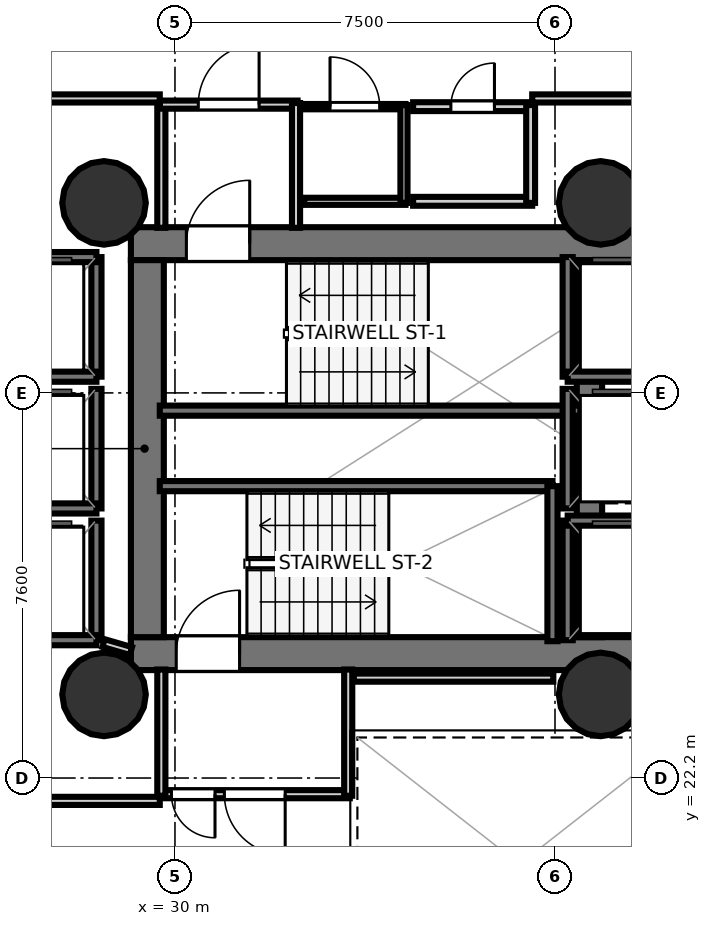
"""IFC4 building model, lengths in metres.
Left out: names, types, materials, properties, quantities, classifications, styles, units other than length and angle.
Written with IfcOpenShell. Run it as: python <this file> out.ifc"""

import sys

from ifc_helpers import new_model, si_unit, direction, frame, frame_2d, origin, origin_2d, place, context, subcontext, project, spatial, rectangle, hollow_circle, extrude, element, fill, save


model = new_model("IFC4")
c1 = context("Model", 3, precision=1e-05, world=origin(), true_north=direction((0.0, 1.0)))
c2 = subcontext(c1, "Body", "Model", "MODEL_VIEW")
j1 = project(units=[si_unit("LENGTHUNIT", "METRE"), si_unit("PLANEANGLEUNIT", "RADIAN")], contexts=[c1])
p1 = place(None, origin())
s1 = spatial("IfcSite", under=j1, at=p1, CompositionType="ELEMENT")
p2 = place(p1, origin())
s2 = spatial("IfcBuilding", under=s1, at=p2, CompositionType="ELEMENT")
p3 = place(p2, frame((0.0, 0.0, 59.9)))
s3 = spatial("IfcBuildingStorey", under=s2, at=p3, CompositionType="ELEMENT", Elevation=59.9)
p4 = place(p3, frame((29.13, 32.745, 0.0), z_axis=(0.0, 0.0, 1.0), x_axis=(1.0, 0.0, 0.0)))
e1 = element("IfcWall", 1, at=p4, inside=s3, PredefinedType="SHEAR", context=c2, shape_type="SweptSolid", body=[
    extrude(rectangle(XDim=10.72, YDim=0.65, at=frame_2d((5.36, 0.0))), origin(), (0.0, 0.0, 1.0), 3.52),
])
p5 = place(p4, frame((1.095, 0.0, 0.0)))
e2 = element("IfcOpeningElement", 2, at=p5, cuts=e1, PredefinedType="OPENING", context=c2, shape_type="SweptSolid", body=[
    extrude(rectangle(XDim=1.25, YDim=2.15, at=frame_2d((0.625, 1.075))), frame((0.0, 0.335, 0.0), z_axis=(0.0, -1.0, 0.0), x_axis=(1.0, 0.0, 0.0)), (0.0, 0.0, 1.0), 0.67),
])
p6 = place(p3, frame((29.13, 24.655, 0.0), z_axis=(0.0, 0.0, 1.0), x_axis=(1.0, 0.0, 0.0)))
e3 = element("IfcWall", 3, at=p6, inside=s3, PredefinedType="SHEAR", context=c2, shape_type="SweptSolid", body=[
    extrude(rectangle(XDim=10.72, YDim=0.65, at=frame_2d((5.36, 0.0))), origin(), (0.0, 0.0, 1.0), 3.52),
])
p7 = place(p6, frame((0.895, 0.0, 0.0)))
e4 = element("IfcOpeningElement", 4, at=p7, cuts=e3, PredefinedType="OPENING", context=c2, shape_type="SweptSolid", body=[
    extrude(rectangle(XDim=1.25, YDim=2.15, at=frame_2d((0.625, 1.075))), frame((0.0, 0.335, 0.0), z_axis=(0.0, -1.0, 0.0), x_axis=(1.0, 0.0, 0.0)), (0.0, 0.0, 1.0), 0.67),
])
p8 = place(p3, frame((29.455, 24.98, 0.0), z_axis=(0.0, 0.0, 1.0), x_axis=(0.0, 1.0, 0.0)))
e5 = element("IfcWall", 5, at=p8, inside=s3, PredefinedType="SHEAR", context=c2, shape_type="SweptSolid", body=[
    extrude(rectangle(XDim=7.44, YDim=0.65, at=frame_2d((3.72, 0.0))), origin(), (0.0, 0.0, 1.0), 3.52),
])
p9 = place(p3, frame((38.18, 24.98, 0.0), z_axis=(0.0, 0.0, 1.0), x_axis=(0.0, 1.0, 0.0)))
e6 = element("IfcWall", 6, at=p9, inside=s3, PredefinedType="SHEAR", context=c2, shape_type="SweptSolid", body=[
    extrude(rectangle(XDim=7.44, YDim=0.5, at=frame_2d((3.72, 0.0))), origin(), (0.0, 0.0, 1.0), 3.52),
])
for number, where, z_axis, x_axis in (
    (7, (28.6, 33.55, 0.0), (0.0, 0.0, 1.0), (1.0, 0.0, 0.0)),
    (8, (28.6, 23.85, 0.0), (0.0, 0.0, 1.0), (1.0, 0.0, 0.0)),
    (9, (38.4, 33.55, 0.0), (0.0, 0.0, 1.0), (1.0, 0.0, 0.0)),
    (10, (38.4, 23.85, 0.0), (0.0, 0.0, 1.0), (1.0, 0.0, 0.0)),
):
    element("IfcColumn", number, at=place(p3, frame(where, z_axis=z_axis, x_axis=x_axis)), inside=s3, PredefinedType="COLUMN", context=c2, shape_type="SweptSolid", body=[
        extrude(hollow_circle(Radius=0.825, WallThickness=0.04, at=origin_2d()), origin(), (0.0, 0.0, 1.0), 3.7),
    ])
p10 = place(p3, frame((29.7, 29.45, 0.0), z_axis=(0.0, 0.0, 1.0), x_axis=(1.0, 0.0, 0.0)))
e11 = element("IfcWall", 11, at=p10, inside=s3, PredefinedType="SOLIDWALL", context=c2, shape_type="SweptSolid", body=[
    extrude(rectangle(XDim=8.3, YDim=0.2, at=frame_2d((4.15, 0.0))), origin(), (0.0, 0.0, 1.0), 3.52),
])
p11 = place(p3, frame((29.7, 27.96, 0.0), z_axis=(0.0, 0.0, 1.0), x_axis=(1.0, 0.0, 0.0)))
e12 = element("IfcWall", 12, at=p11, inside=s3, PredefinedType="SOLIDWALL", context=c2, shape_type="SweptSolid", body=[
    extrude(rectangle(XDim=7.75, YDim=0.2, at=frame_2d((3.875, 0.0))), origin(), (0.0, 0.0, 1.0), 3.52),
])
p12 = place(p3, frame((37.45, 24.9, 0.0), z_axis=(0.0, 0.0, 1.0), x_axis=(0.0, 1.0, 0.0)))
e13 = element("IfcWall", 13, at=p12, inside=s3, PredefinedType="SOLIDWALL", context=c2, shape_type="SweptSolid", body=[
    extrude(rectangle(XDim=3.06, YDim=0.2, at=frame_2d((1.53, 0.0))), origin(), (0.0, 0.0, 1.0), 3.52),
])
p13 = place(p3, frame((37.75, 30.12, 0.0), z_axis=(0.0, 0.0, 1.0), x_axis=(0.0, 1.0, 0.0)))
e14 = element("IfcWall", 14, at=p13, inside=s3, PredefinedType="SOLIDWALL", context=c2, shape_type="SweptSolid", body=[
    extrude(rectangle(XDim=2.36, YDim=0.2, at=frame_2d((1.18, 0.0))), origin(), (0.0, 0.0, 1.0), 3.52),
])
p14 = place(p3, frame((37.75, 30.12, 0.0), z_axis=(0.0, 0.0, 1.0), x_axis=(1.0, 0.0, 0.0)))
e15 = element("IfcWall", 15, at=p14, inside=s3, PredefinedType="SOLIDWALL", context=c2, shape_type="SweptSolid", body=[
    extrude(rectangle(XDim=2.1, YDim=0.2, at=frame_2d((1.05, 0.0))), origin(), (0.0, 0.0, 1.0), 3.52),
])
p15 = place(p3, frame((37.75, 24.92, 0.0), z_axis=(0.0, 0.0, 1.0), x_axis=(0.0, 1.0, 0.0)))
e16 = element("IfcWall", 16, at=p15, inside=s3, PredefinedType="SOLIDWALL", context=c2, shape_type="SweptSolid", body=[
    extrude(rectangle(XDim=2.36, YDim=0.2, at=frame_2d((1.18, 0.0))), origin(), (0.0, 0.0, 1.0), 3.52),
])
p16 = place(p3, frame((37.75, 27.28, 0.0), z_axis=(0.0, 0.0, 1.0), x_axis=(1.0, 0.0, 0.0)))
e17 = element("IfcWall", 17, at=p16, inside=s3, PredefinedType="SOLIDWALL", context=c2, shape_type="SweptSolid", body=[
    extrude(rectangle(XDim=2.1, YDim=0.2, at=frame_2d((1.05, 0.0))), origin(), (0.0, 0.0, 1.0), 3.52),
])
p17 = place(p3, frame((28.45, 30.12, 0.0), z_axis=(0.0, 0.0, 1.0), x_axis=(0.0, 1.0, 0.0)))
e18 = element("IfcWall", 18, at=p17, inside=s3, PredefinedType="SOLIDWALL", context=c2, shape_type="SweptSolid", body=[
    extrude(rectangle(XDim=2.36, YDim=0.2, at=frame_2d((1.18, 0.0))), origin(), (0.0, 0.0, 1.0), 3.52),
])
for number, where, z_axis, x_axis in (
    (19, (26.35, 32.48, 0.0), (0.0, 0.0, 1.0), (1.0, 0.0, 0.0)),
    (20, (26.35, 30.12, 0.0), (0.0, 0.0, 1.0), (1.0, 0.0, 0.0)),
):
    element("IfcWall", number, at=place(p3, frame(where, z_axis=z_axis, x_axis=x_axis)), inside=s3, PredefinedType="SOLIDWALL", context=c2, shape_type="SweptSolid", body=[
        extrude(rectangle(XDim=2.1, YDim=0.2, at=frame_2d((1.05, 0.0))), origin(), (0.0, 0.0, 1.0), 3.52),
    ])
p18 = place(p3, frame((28.45, 27.52, 0.0), z_axis=(0.0, 0.0, 1.0), x_axis=(0.0, 1.0, 0.0)))
e21 = element("IfcWall", 21, at=p18, inside=s3, PredefinedType="SOLIDWALL", context=c2, shape_type="SweptSolid", body=[
    extrude(rectangle(XDim=2.36, YDim=0.2, at=frame_2d((1.18, 0.0))), origin(), (0.0, 0.0, 1.0), 3.52),
])
p19 = place(p3, frame((26.35, 27.52, 0.0), z_axis=(0.0, 0.0, 1.0), x_axis=(1.0, 0.0, 0.0)))
e22 = element("IfcWall", 22, at=p19, inside=s3, PredefinedType="SOLIDWALL", context=c2, shape_type="SweptSolid", body=[
    extrude(rectangle(XDim=2.1, YDim=0.2, at=frame_2d((1.05, 0.0))), origin(), (0.0, 0.0, 1.0), 3.52),
])
p20 = place(p3, frame((28.45, 24.92, 0.0), z_axis=(0.0, 0.0, 1.0), x_axis=(0.0, 1.0, 0.0)))
e23 = element("IfcWall", 23, at=p20, inside=s3, PredefinedType="SOLIDWALL", context=c2, shape_type="SweptSolid", body=[
    extrude(rectangle(XDim=2.36, YDim=0.2, at=frame_2d((1.18, 0.0))), origin(), (0.0, 0.0, 1.0), 3.52),
])
p21 = place(p3, frame((26.35, 24.92, 0.0), z_axis=(0.0, 0.0, 1.0), x_axis=(1.0, 0.0, 0.0)))
e24 = element("IfcWall", 24, at=p21, inside=s3, PredefinedType="SOLIDWALL", context=c2, shape_type="SweptSolid", body=[
    extrude(rectangle(XDim=2.1, YDim=0.2, at=frame_2d((1.05, 0.0))), origin(), (0.0, 0.0, 1.0), 3.52),
])
p22 = place(p3, frame((37.75, 27.52, 0.0), z_axis=(0.0, 0.0, 1.0), x_axis=(0.0, 1.0, 0.0)))
e25 = element("IfcWall", 25, at=p22, inside=s3, PredefinedType="SOLIDWALL", context=c2, shape_type="SweptSolid", body=[
    extrude(rectangle(XDim=2.36, YDim=0.2, at=frame_2d((1.18, 0.0))), origin(), (0.0, 0.0, 1.0), 3.52),
])
p23 = place(p3, frame((29.731, 33.058, 0.0), z_axis=(0.0, 0.0, 1.0), x_axis=(0.0, 1.0, 0.0)))
e26 = element("IfcWall", 26, at=p23, inside=s3, PredefinedType="PARTITIONING", context=c2, shape_type="SweptSolid", body=[
    extrude(rectangle(XDim=2.462, YDim=0.16, at=frame_2d((1.231, 0.0))), origin(), (0.0, 0.0, 1.0), 2.84),
])
p24 = place(p3, frame((29.7, 35.489, 0.0), z_axis=(0.0, 0.0, 1.0), x_axis=(1.0, 0.0, 0.0)))
e27 = element("IfcWall", 27, at=p24, inside=s3, PredefinedType="PARTITIONING", context=c2, shape_type="SweptSolid", body=[
    extrude(rectangle(XDim=2.72, YDim=0.16, at=frame_2d((1.36, 0.0))), origin(), (0.0, 0.0, 1.0), 2.84),
])
p25 = place(p24, frame((0.76, 0.0, 0.0)))
e28 = element("IfcOpeningElement", 28, at=p25, cuts=e27, PredefinedType="OPENING", context=c2, shape_type="SweptSolid", body=[
    extrude(rectangle(XDim=1.2, YDim=2.15, at=frame_2d((0.6, 1.075))), frame((0.0, 0.09, 0.0), z_axis=(0.0, -1.0, 0.0), x_axis=(1.0, 0.0, 0.0)), (0.0, 0.0, 1.0), 0.18),
])
p26 = place(p3, frame((32.389, 35.52, 0.0), z_axis=(0.0, 0.0, 1.0), x_axis=(0.0, -1.0, 0.0)))
e29 = element("IfcWall", 29, at=p26, inside=s3, PredefinedType="PARTITIONING", context=c2, shape_type="SweptSolid", body=[
    extrude(rectangle(XDim=2.462, YDim=0.16, at=frame_2d((1.231, 0.0))), origin(), (0.0, 0.0, 1.0), 2.84),
])
p27 = place(p3, frame((33.45, 21.881, 0.0), z_axis=(0.0, 0.0, 1.0), x_axis=(-1.0, 0.0, 0.0)))
e30 = element("IfcWall", 30, at=p27, inside=s3, PredefinedType="PARTITIONING", context=c2, shape_type="SweptSolid", body=[
    extrude(rectangle(XDim=3.75, YDim=0.16, at=frame_2d((1.875, 0.0))), origin(), (0.0, 0.0, 1.0), 2.84),
])
p28 = place(p27, frame((1.275, 0.0, 0.0)))
e31 = element("IfcOpeningElement", 31, at=p28, cuts=e30, PredefinedType="OPENING", context=c2, shape_type="SweptSolid", body=[
    extrude(rectangle(XDim=1.2, YDim=2.15, at=frame_2d((0.6, 1.075))), frame((0.0, 0.09, 0.0), z_axis=(0.0, -1.0, 0.0), x_axis=(1.0, 0.0, 0.0)), (0.0, 0.0, 1.0), 0.18),
])
p29 = place(p27, frame((2.66, 0.0, 0.0)))
e32 = element("IfcOpeningElement", 32, at=p29, cuts=e30, PredefinedType="OPENING", context=c2, shape_type="SweptSolid", body=[
    extrude(rectangle(XDim=0.86, YDim=2.05, at=frame_2d((0.43, 1.025))), frame((0.0, 0.09, 0.0), z_axis=(0.0, -1.0, 0.0), x_axis=(1.0, 0.0, 0.0)), (0.0, 0.0, 1.0), 0.18),
])
for number, where, z_axis, x_axis in (
    (33, (29.731, 21.85, 0.0), (0.0, 0.0, 1.0), (0.0, 1.0, 0.0)),
    (34, (33.419, 24.342, 0.0), (0.0, 0.0, 1.0), (0.0, -1.0, 0.0)),
):
    element("IfcWall", number, at=place(p3, frame(where, z_axis=z_axis, x_axis=x_axis)), inside=s3, PredefinedType="PARTITIONING", context=c2, shape_type="SweptSolid", body=[
        extrude(rectangle(XDim=2.492, YDim=0.16, at=frame_2d((1.246, 0.0))), origin(), (0.0, 0.0, 1.0), 2.84),
    ])
p30 = place(p3, frame((34.55, 33.581, 0.0), z_axis=(0.0, 0.0, 1.0), x_axis=(-1.0, 0.0, 0.0)))
e35 = element("IfcWall", 35, at=p30, inside=s3, PredefinedType="PARTITIONING", context=c2, shape_type="SweptSolid", body=[
    extrude(rectangle(XDim=2.0, YDim=0.14, at=frame_2d((1.0, 0.0))), origin(), (0.0, 0.0, 1.0), 2.84),
])
p31 = place(p3, frame((32.55, 35.449, 0.0), z_axis=(0.0, 0.0, 1.0), x_axis=(1.0, 0.0, 0.0)))
e36 = element("IfcWall", 36, at=p31, inside=s3, PredefinedType="PARTITIONING", context=c2, shape_type="SweptSolid", body=[
    extrude(rectangle(XDim=2.0, YDim=0.105, at=frame_2d((1.0, 0.0))), origin(), (0.0, 0.0, 1.0), 2.84),
])
p32 = place(p31, frame((0.51, 0.0, 0.0)))
e37 = element("IfcOpeningElement", 37, at=p32, cuts=e36, PredefinedType="OPENING", context=c2, shape_type="SweptSolid", body=[
    extrude(rectangle(XDim=0.98, YDim=2.1, at=frame_2d((0.49, 1.05))), frame((0.0, 0.062, 0.0), z_axis=(0.0, -1.0, 0.0), x_axis=(1.0, 0.0, 0.0)), (0.0, 0.0, 1.0), 0.125),
])
p33 = place(p3, frame((34.519, 35.48, 0.0), z_axis=(0.0, 0.0, 1.0), x_axis=(0.0, -1.0, 0.0)))
e38 = element("IfcWall", 38, at=p33, inside=s3, PredefinedType="PARTITIONING", context=c2, shape_type="SweptSolid", body=[
    extrude(rectangle(XDim=1.93, YDim=0.14, at=frame_2d((0.965, 0.0))), origin(), (0.0, 0.0, 1.0), 2.84),
])
p34 = place(p3, frame((37.05, 33.581, 0.0), z_axis=(0.0, 0.0, 1.0), x_axis=(-1.0, 0.0, 0.0)))
e39 = element("IfcWall", 39, at=p34, inside=s3, PredefinedType="PLUMBINGWALL", context=c2, shape_type="SweptSolid", body=[
    extrude(rectangle(XDim=2.35, YDim=0.175, at=frame_2d((1.175, 0.0))), origin(), (0.0, 0.0, 1.0), 2.84),
])
p35 = place(p3, frame((34.7, 35.449, 0.0), z_axis=(0.0, 0.0, 1.0), x_axis=(1.0, 0.0, 0.0)))
e40 = element("IfcWall", 40, at=p35, inside=s3, PredefinedType="PLUMBINGWALL", context=c2, shape_type="SweptSolid", body=[
    extrude(rectangle(XDim=2.35, YDim=0.175, at=frame_2d((1.175, 0.0))), origin(), (0.0, 0.0, 1.0), 2.84),
])
p36 = place(p35, frame((0.745, 0.0, 0.0)))
e41 = element("IfcOpeningElement", 41, at=p36, cuts=e40, PredefinedType="OPENING", context=c2, shape_type="SweptSolid", body=[
    extrude(rectangle(XDim=0.86, YDim=2.05, at=frame_2d((0.43, 1.025))), frame((0.0, 0.097, 0.0), z_axis=(0.0, -1.0, 0.0), x_axis=(1.0, 0.0, 0.0)), (0.0, 0.0, 1.0), 0.195),
])
p37 = place(p3, frame((37.019, 35.48, 0.0), z_axis=(0.0, 0.0, 1.0), x_axis=(0.0, -1.0, 0.0)))
e42 = element("IfcWall", 42, at=p37, inside=s3, PredefinedType="PLUMBINGWALL", context=c2, shape_type="SweptSolid", body=[
    extrude(rectangle(XDim=1.93, YDim=0.175, at=frame_2d((0.965, 0.0))), origin(), (0.0, 0.0, 1.0), 2.84),
])
p38 = place(p3, frame((29.13, 24.706, 0.0), z_axis=(0.0, 0.0, 1.0), x_axis=(-0.960451214223, 0.278448316742, 0.0)))
e43 = element("IfcWall", 43, at=p38, inside=s3, PredefinedType="PARTITIONING", context=c2, shape_type="SweptSolid", body=[
    extrude(rectangle(XDim=0.562, YDim=0.16, at=frame_2d((0.281, 0.0))), origin(), (0.0, 0.0, 1.0), 2.84),
])
p39 = place(p3, frame((37.467, 24.181, 0.0), z_axis=(0.0, 0.0, 1.0), x_axis=(-1.0, 0.0, 0.0)))
e44 = element("IfcWall", 44, at=p39, inside=s3, PredefinedType="PARTITIONING", context=c2, shape_type="SweptSolid", body=[
    extrude(rectangle(XDim=3.937, YDim=0.16, at=frame_2d((1.968, 0.0))), origin(), (0.0, 0.0, 1.0), 2.84),
])
p40 = place(p3, frame((39.818, 35.611, 0.0), z_axis=(0.0, 0.0, 1.0), x_axis=(-1.0, 0.0, 0.0)))
e45 = element("IfcWall", 45, at=p40, inside=s3, PredefinedType="PARTITIONING", context=c2, shape_type="SweptSolid", body=[
    extrude(rectangle(XDim=2.768, YDim=0.16, at=frame_2d((1.384, 0.0))), origin(), (0.0, 0.0, 1.0), 2.84),
])
p41 = place(p3, frame((29.7, 35.611, 0.0), z_axis=(0.0, 0.0, 1.0), x_axis=(-1.0, 0.0, 0.0)))
e46 = element("IfcWall", 46, at=p41, inside=s3, PredefinedType="PARTITIONING", context=c2, shape_type="SweptSolid", body=[
    extrude(rectangle(XDim=3.28, YDim=0.16, at=frame_2d((1.64, 0.0))), origin(), (0.0, 0.0, 1.0), 2.798),
])
p42 = place(p3, frame((26.42, 21.749, 0.0), z_axis=(0.0, 0.0, 1.0), x_axis=(1.0, 0.0, 0.0)))
e47 = element("IfcWall", 47, at=p42, inside=s3, PredefinedType="PARTITIONING", context=c2, shape_type="SweptSolid", body=[
    extrude(rectangle(XDim=3.28, YDim=0.16, at=frame_2d((1.64, 0.0))), origin(), (0.0, 0.0, 1.0), 2.84),
])
p43 = place(p5, origin())
e48 = element("IfcDoor", 48, at=p43, inside=s3, OperationType="SINGLE_SWING_RIGHT", PredefinedType="DOOR", context=c2, shape_type="SweptSolid", body=[
    extrude(rectangle(XDim=1.25, YDim=2.15, at=frame_2d((0.625, 1.075))), frame((0.0, 0.025, 0.0), z_axis=(0.0, -1.0, 0.0), x_axis=(1.0, 0.0, 0.0)), (0.0, 0.0, 1.0), 0.05),
])
fill(e2, e48)
p44 = place(p7, origin())
e49 = element("IfcDoor", 49, at=p44, inside=s3, OperationType="SINGLE_SWING_RIGHT", PredefinedType="DOOR", context=c2, shape_type="SweptSolid", body=[
    extrude(rectangle(XDim=1.25, YDim=2.15, at=frame_2d((0.625, 1.075))), frame((0.0, 0.025, 0.0), z_axis=(0.0, -1.0, 0.0), x_axis=(1.0, 0.0, 0.0)), (0.0, 0.0, 1.0), 0.05),
])
fill(e4, e49)
p45 = place(p25, origin())
e50 = element("IfcDoor", 50, at=p45, inside=s3, OperationType="SINGLE_SWING_RIGHT", PredefinedType="DOOR", context=c2, shape_type="SweptSolid", body=[
    extrude(rectangle(XDim=1.2, YDim=2.15, at=frame_2d((0.6, 1.075))), frame((0.0, 0.025, 0.0), z_axis=(0.0, -1.0, 0.0), x_axis=(1.0, 0.0, 0.0)), (0.0, 0.0, 1.0), 0.05),
])
fill(e28, e50)
p46 = place(p28, origin())
e51 = element("IfcDoor", 51, at=p46, inside=s3, OperationType="SINGLE_SWING_LEFT", PredefinedType="DOOR", context=c2, shape_type="SweptSolid", body=[
    extrude(rectangle(XDim=1.2, YDim=2.15, at=frame_2d((0.6, 1.075))), frame((0.0, 0.025, 0.0), z_axis=(0.0, -1.0, 0.0), x_axis=(1.0, 0.0, 0.0)), (0.0, 0.0, 1.0), 0.05),
])
fill(e31, e51)
p47 = place(p32, origin())
e52 = element("IfcDoor", 52, at=p47, inside=s3, OperationType="SINGLE_SWING_LEFT", PredefinedType="DOOR", context=c2, shape_type="SweptSolid", body=[
    extrude(rectangle(XDim=0.98, YDim=2.1, at=frame_2d((0.49, 1.05))), frame((0.0, 0.025, 0.0), z_axis=(0.0, -1.0, 0.0), x_axis=(1.0, 0.0, 0.0)), (0.0, 0.0, 1.0), 0.05),
])
fill(e37, e52)
p48 = place(p36, origin())
e53 = element("IfcDoor", 53, at=p48, inside=s3, OperationType="SINGLE_SWING_RIGHT", PredefinedType="DOOR", context=c2, shape_type="SweptSolid", body=[
    extrude(rectangle(XDim=0.86, YDim=2.05, at=frame_2d((0.43, 1.025))), frame((0.0, 0.025, 0.0), z_axis=(0.0, -1.0, 0.0), x_axis=(1.0, 0.0, 0.0)), (0.0, 0.0, 1.0), 0.05),
])
fill(e41, e53)
p49 = place(p29, origin())
e54 = element("IfcDoor", 54, at=p49, inside=s3, OperationType="SINGLE_SWING_LEFT", PredefinedType="DOOR", context=c2, shape_type="SweptSolid", body=[
    extrude(rectangle(XDim=0.86, YDim=2.05, at=frame_2d((0.43, 1.025))), frame((0.0, 0.025, 0.0), z_axis=(0.0, -1.0, 0.0), x_axis=(1.0, 0.0, 0.0)), (0.0, 0.0, 1.0), 0.05),
])
fill(e32, e54)
save(model, sys.argv[1])
